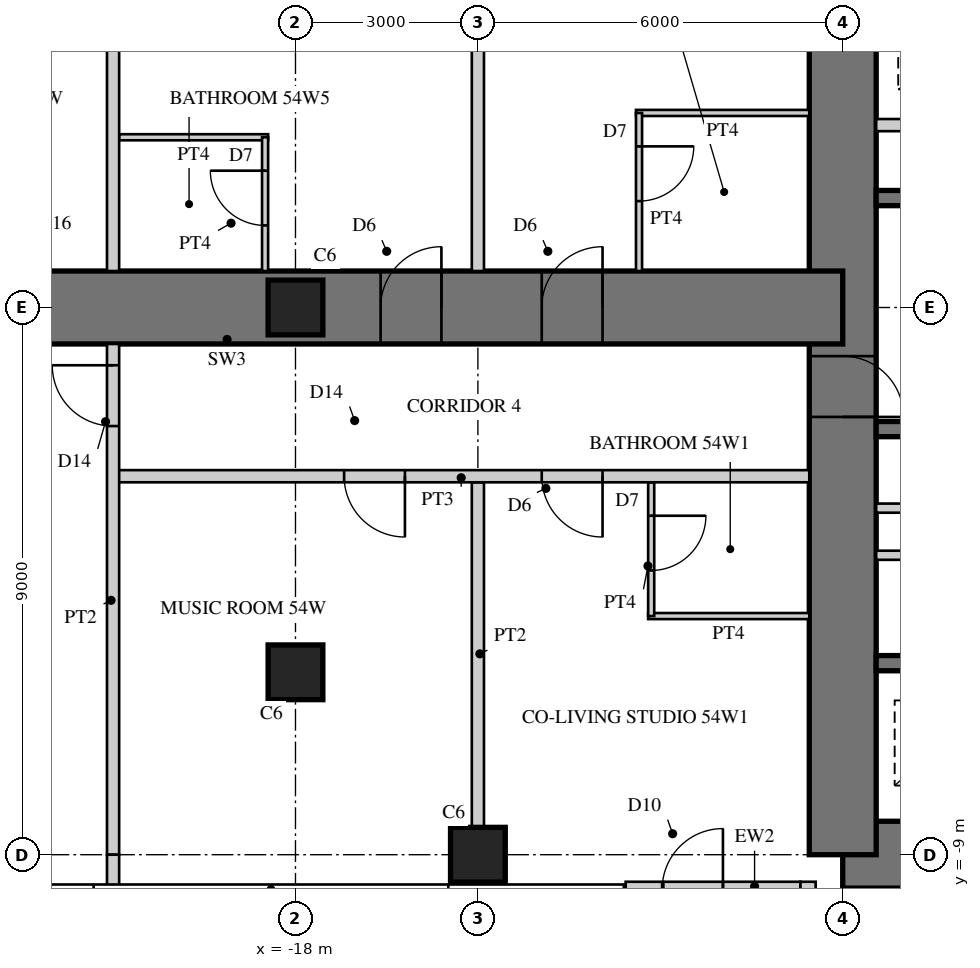
"""IFC4 building model, lengths in metres.
Left out: names, types, materials, properties, quantities, classifications, styles, units other than length and angle.
Written with IfcOpenShell. Run it as: python <this file> out.ifc"""

import sys

from ifc_helpers import new_model, si_unit, direction, frame, frame_2d, origin, origin_2d, place, context, subcontext, project, spatial, rectangle, hollow_rectangle, extrude, element, fill, save


model = new_model("IFC4")
c1 = context("Model", 3, precision=1e-05, world=origin(), true_north=direction((0.0, 1.0)))
c2 = subcontext(c1, "Body", "Model", "MODEL_VIEW")
j1 = project(units=[si_unit("LENGTHUNIT", "METRE"), si_unit("PLANEANGLEUNIT", "RADIAN")], contexts=[c1])
p1 = place(None, origin())
s1 = spatial("IfcSite", under=j1, at=p1, CompositionType="ELEMENT")
p2 = place(p1, origin())
s2 = spatial("IfcBuilding", under=s1, at=p2, CompositionType="ELEMENT")
p3 = place(p2, frame((0.0, 0.0, 213.7)))
s3 = spatial("IfcBuildingStorey", under=s2, at=p3, CompositionType="ELEMENT", Elevation=213.7)
p4 = place(p3, frame((-9.0, -9.0, 0.0), z_axis=(0.0, 0.0, 1.0), x_axis=(1.0, 0.0, 0.0)))
e1 = element("IfcWall", 1, at=p4, inside=s3, PredefinedType="SHEAR", context=c2, shape_type="SweptSolid", body=[
    extrude(rectangle(XDim=18.0, YDim=1.1, at=frame_2d((9.0, 0.0))), origin(), (0.0, 0.0, 1.0), 3.4),
])
p5 = place(p4, frame((9.8, 0.0, 0.0)))
e2 = element("IfcOpeningElement", 2, at=p5, cuts=e1, PredefinedType="OPENING", context=c2, shape_type="SweptSolid", body=[
    extrude(rectangle(XDim=1.0, YDim=2.4, at=frame_2d((0.5, 1.2))), frame((0.0, 0.56, 0.0), z_axis=(0.0, -1.0, 0.0), x_axis=(1.0, 0.0, 0.0)), (0.0, 0.0, 1.0), 1.12),
])
p6 = place(p3, frame((-9.0, 9.0, 0.0), z_axis=(0.0, 0.0, 1.0), x_axis=(0.0, -1.0, 0.0)))
e3 = element("IfcWall", 3, at=p6, inside=s3, PredefinedType="SHEAR", context=c2, shape_type="SweptSolid", body=[
    extrude(rectangle(XDim=18.0, YDim=1.1, at=frame_2d((9.0, 0.0))), origin(), (0.0, 0.0, 1.0), 3.4),
])
p7 = place(p6, frame((9.8, 0.0, 0.0)))
e4 = element("IfcOpeningElement", 4, at=p7, cuts=e3, PredefinedType="OPENING", context=c2, shape_type="SweptSolid", body=[
    extrude(rectangle(XDim=1.0, YDim=2.4, at=frame_2d((0.5, 1.2))), frame((0.0, 0.56, 0.0), z_axis=(0.0, -1.0, 0.0), x_axis=(1.0, 0.0, 0.0)), (0.0, 0.0, 1.0), 1.12),
])
p8 = place(p3, frame((-2.125, 1.8, 0.0), z_axis=(0.0, 0.0, 1.0), x_axis=(-1.0, 0.0, 0.0)))
e5 = element("IfcWall", 5, at=p8, inside=s3, PredefinedType="SHEAR", context=c2, shape_type="SweptSolid", body=[
    extrude(rectangle(XDim=6.325, YDim=0.25, at=frame_2d((3.163, 0.0))), origin(), (0.0, 0.0, 1.0), 3.4),
])
p9 = place(p3, frame((-5.725, 3.0, 0.0), z_axis=(0.0, 0.0, 1.0), x_axis=(-1.0, 0.0, 0.0)))
e6 = element("IfcWall", 6, at=p9, inside=s3, PredefinedType="PARTITIONING", context=c2, shape_type="SweptSolid", body=[
    extrude(rectangle(XDim=2.725, YDim=0.2, at=frame_2d((1.362, 0.0))), origin(), (0.0, 0.0, 1.0), 3.4),
])
p10 = place(p3, frame((-1.925, -2.0, 0.0), z_axis=(0.0, 0.0, 1.0), x_axis=(-1.0, 0.0, 0.0)))
e7 = element("IfcWall", 7, at=p10, inside=s3, PredefinedType="SHEAR", context=c2, shape_type="SweptSolid", body=[
    extrude(rectangle(XDim=6.525, YDim=0.25, at=frame_2d((3.262, 0.0))), origin(), (0.0, 0.0, 1.0), 3.4),
])
p11 = place(p3, frame((-1.925, -5.85, 0.0), z_axis=(0.0, 0.0, 1.0), x_axis=(-1.0, 0.0, 0.0)))
e8 = element("IfcWall", 8, at=p11, inside=s3, PredefinedType="SHEAR", context=c2, shape_type="SweptSolid", body=[
    extrude(rectangle(XDim=6.525, YDim=0.25, at=frame_2d((3.262, 0.0))), origin(), (0.0, 0.0, 1.0), 3.4),
])
p12 = place(p11, frame((0.471, 0.0, 0.0)))
e9 = element("IfcOpeningElement", 9, at=p12, cuts=e8, PredefinedType="OPENING", context=c2, shape_type="SweptSolid", body=[
    extrude(rectangle(XDim=1.1, YDim=2.2, at=frame_2d((0.55, 1.1))), frame((0.0, 0.135, 0.0), z_axis=(0.0, -1.0, 0.0), x_axis=(1.0, 0.0, 0.0)), (0.0, 0.0, 1.0), 0.27),
])
p13 = place(p11, frame((2.712, 0.0, 0.0)))
e10 = element("IfcOpeningElement", 10, at=p13, cuts=e8, PredefinedType="OPENING", context=c2, shape_type="SweptSolid", body=[
    extrude(rectangle(XDim=1.1, YDim=2.2, at=frame_2d((0.55, 1.1))), frame((0.0, 0.135, 0.0), z_axis=(0.0, -1.0, 0.0), x_axis=(1.0, 0.0, 0.0)), (0.0, 0.0, 1.0), 0.27),
])
p14 = place(p11, frame((4.954, 0.0, 0.0)))
e11 = element("IfcOpeningElement", 11, at=p14, cuts=e8, PredefinedType="OPENING", context=c2, shape_type="SweptSolid", body=[
    extrude(rectangle(XDim=1.1, YDim=2.2, at=frame_2d((0.55, 1.1))), frame((0.0, 0.135, 0.0), z_axis=(0.0, -1.0, 0.0), x_axis=(1.0, 0.0, 0.0)), (0.0, 0.0, 1.0), 0.27),
])
p15 = place(p3, frame((-1.925, -3.3, 0.0), z_axis=(0.0, 0.0, 1.0), x_axis=(-1.0, 0.0, 0.0)))
e12 = element("IfcWall", 12, at=p15, inside=s3, PredefinedType="PARTITIONING", context=c2, shape_type="SweptSolid", body=[
    extrude(rectangle(XDim=6.525, YDim=0.15, at=frame_2d((3.262, 0.0))), origin(), (0.0, 0.0, 1.0), 3.4),
])
p16 = place(p15, frame((0.075, 0.0, 0.0)))
e13 = element("IfcOpeningElement", 13, at=p16, cuts=e12, PredefinedType="OPENING", context=c2, shape_type="SweptSolid", body=[
    extrude(rectangle(XDim=0.8, YDim=2.1, at=frame_2d((0.4, 1.05))), frame((0.0, 0.085, 0.0), z_axis=(0.0, -1.0, 0.0), x_axis=(1.0, 0.0, 0.0)), (0.0, 0.0, 1.0), 0.17),
])
p17 = place(p15, frame((3.675, 0.0, 0.0)))
e14 = element("IfcOpeningElement", 14, at=p17, cuts=e12, PredefinedType="OPENING", context=c2, shape_type="SweptSolid", body=[
    extrude(rectangle(XDim=0.8, YDim=2.1, at=frame_2d((0.4, 1.05))), frame((0.0, 0.085, 0.0), z_axis=(0.0, -1.0, 0.0), x_axis=(1.0, 0.0, 0.0)), (0.0, 0.0, 1.0), 0.17),
])
p18 = place(p3, frame((-9.0, 0.0, 0.0), z_axis=(0.0, 0.0, 1.0), x_axis=(-1.0, 0.0, 0.0)))
e15 = element("IfcWall", 15, at=p18, inside=s3, PredefinedType="SHEAR", context=c2, shape_type="SweptSolid", body=[
    extrude(rectangle(XDim=18.0, YDim=1.2, at=frame_2d((9.0, 0.0))), origin(), (0.0, 0.0, 1.0), 3.4),
])
p19 = place(p18, frame((3.95, 0.0, 0.0)))
e16 = element("IfcOpeningElement", 16, at=p19, cuts=e15, PredefinedType="OPENING", context=c2, shape_type="SweptSolid", body=[
    extrude(rectangle(XDim=1.0, YDim=2.15, at=frame_2d((0.5, 1.075))), frame((0.0, 0.61, 0.0), z_axis=(0.0, -1.0, 0.0), x_axis=(1.0, 0.0, 0.0)), (0.0, 0.0, 1.0), 1.22),
])
p20 = place(p18, frame((6.6, 0.0, 0.0)))
e17 = element("IfcOpeningElement", 17, at=p20, cuts=e15, PredefinedType="OPENING", context=c2, shape_type="SweptSolid", body=[
    extrude(rectangle(XDim=1.0, YDim=2.15, at=frame_2d((0.5, 1.075))), frame((0.0, 0.61, 0.0), z_axis=(0.0, -1.0, 0.0), x_axis=(1.0, 0.0, 0.0)), (0.0, 0.0, 1.0), 1.22),
])
p21 = place(p18, frame((13.25, 0.0, 0.0)))
e18 = element("IfcOpeningElement", 18, at=p21, cuts=e15, PredefinedType="OPENING", context=c2, shape_type="SweptSolid", body=[
    extrude(rectangle(XDim=1.0, YDim=2.0, at=frame_2d((0.5, 1.0))), frame((0.0, 0.61, 0.0), z_axis=(0.0, -1.0, 0.0), x_axis=(1.0, 0.0, 0.0)), (0.0, 0.0, 1.0), 1.22),
])
for number, where, z_axis, x_axis in (
    (19, (-15.0, -9.0, 0.0), (0.0, 0.0, 1.0), (1.0, 0.0, 0.0)),
    (20, (-18.0, 0.0, 0.0), (0.0, 0.0, 1.0), (1.0, 0.0, 0.0)),
    (21, (-18.0, -6.0, 0.0), (0.0, 0.0, 1.0), (1.0, 0.0, 0.0)),
):
    element("IfcColumn", number, at=place(p3, frame(where, z_axis=z_axis, x_axis=x_axis)), inside=s3, PredefinedType="COLUMN", context=c2, shape_type="SweptSolid", body=[
        extrude(rectangle(XDim=0.9, YDim=0.9, at=origin_2d()), origin(), (0.0, 0.0, 1.0), 3.4),
    ])
p22 = place(p3, frame((-12.57, -9.57, 0.0), z_axis=(0.0, 0.0, 1.0), x_axis=(1.0, 0.0, 0.0)))
e22 = element("IfcWall", 22, at=p22, inside=s3, PredefinedType="SOLIDWALL", context=c2, shape_type="SweptSolid", body=[
    extrude(rectangle(XDim=2.875, YDim=0.25, at=frame_2d((1.438, 0.0))), origin(), (0.0, 0.0, 1.0), 3.15),
])
p23 = place(p22, frame((0.6, 0.0, 0.0)))
e23 = element("IfcOpeningElement", 23, at=p23, cuts=e22, PredefinedType="OPENING", context=c2, shape_type="SweptSolid", body=[
    extrude(rectangle(XDim=1.0, YDim=2.2, at=frame_2d((0.5, 1.1))), frame((0.0, 0.135, 0.0), z_axis=(0.0, -1.0, 0.0), x_axis=(1.0, 0.0, 0.0)), (0.0, 0.0, 1.0), 0.27),
])
p24 = place(p3, frame((-9.57, -9.445, 0.0), z_axis=(0.0, 0.0, 1.0), x_axis=(0.0, -1.0, 0.0)))
e24 = element("IfcWall", 24, at=p24, inside=s3, PredefinedType="SOLIDWALL", context=c2, shape_type="SweptSolid", body=[
    extrude(rectangle(XDim=3.125, YDim=0.25, at=frame_2d((1.562, 0.0))), origin(), (0.0, 0.0, 1.0), 3.15),
])
p25 = place(p24, frame((0.6, 0.0, 0.0)))
e25 = element("IfcOpeningElement", 25, at=p25, cuts=e24, PredefinedType="OPENING", context=c2, shape_type="SweptSolid", body=[
    extrude(rectangle(XDim=1.0, YDim=2.2, at=frame_2d((0.5, 1.1))), frame((0.0, 0.135, 0.0), z_axis=(0.0, -1.0, 0.0), x_axis=(1.0, 0.0, 0.0)), (0.0, 0.0, 1.0), 0.27),
])
p26 = place(p3, frame((-3.325, -4.075, 0.0), z_axis=(0.0, 0.0, 1.0), x_axis=(-1.0, 0.0, 0.0)))
e26 = element("IfcWall", 26, at=p26, inside=s3, PredefinedType="PARTITIONING", context=c2, shape_type="SweptSolid", body=[
    extrude(rectangle(XDim=5.125, YDim=0.15, at=frame_2d((2.562, 0.0))), origin(), (0.0, 0.0, 1.0), 3.15),
])
p27 = place(p26, frame((2.062, 0.0, 0.0)))
e27 = element("IfcOpeningElement", 27, at=p27, cuts=e26, PredefinedType="OPENING", context=c2, shape_type="SweptSolid", body=[
    extrude(rectangle(XDim=1.0, YDim=2.1, at=frame_2d((0.5, 1.05))), frame((0.0, 0.085, 0.0), z_axis=(0.0, -1.0, 0.0), x_axis=(1.0, 0.0, 0.0)), (0.0, 0.0, 1.0), 0.17),
])
p28 = place(p3, frame((-9.55, -5.075, 0.0), z_axis=(0.0, 0.0, 1.0), x_axis=(-1.0, 0.0, 0.0)))
e28 = element("IfcWall", 28, at=p28, inside=s3, PredefinedType="PARTITIONING", context=c2, shape_type="SweptSolid", body=[
    extrude(rectangle(XDim=2.65, YDim=0.1, at=frame_2d((1.325, 0.0))), origin(), (0.0, 0.0, 1.0), 3.15),
])
p29 = place(p3, frame((-12.15, -2.875, 0.0), z_axis=(0.0, 0.0, 1.0), x_axis=(0.0, -1.0, 0.0)))
e29 = element("IfcWall", 29, at=p29, inside=s3, PredefinedType="PARTITIONING", context=c2, shape_type="SweptSolid", body=[
    extrude(rectangle(XDim=2.2, YDim=0.1, at=frame_2d((1.1, 0.0))), origin(), (0.0, 0.0, 1.0), 3.15),
])
p30 = place(p29, frame((0.55, 0.0, 0.0)))
e30 = element("IfcOpeningElement", 30, at=p30, cuts=e29, PredefinedType="OPENING", context=c2, shape_type="SweptSolid", body=[
    extrude(rectangle(XDim=0.9, YDim=2.1, at=frame_2d((0.45, 1.05))), frame((0.0, 0.06, 0.0), z_axis=(0.0, -1.0, 0.0), x_axis=(1.0, 0.0, 0.0)), (0.0, 0.0, 1.0), 0.12),
])
p31 = place(p3, frame((-9.55, 3.2, 0.0), z_axis=(0.0, 0.0, 1.0), x_axis=(-1.0, 0.0, 0.0)))
e31 = element("IfcWall", 31, at=p31, inside=s3, PredefinedType="PARTITIONING", context=c2, shape_type="SweptSolid", body=[
    extrude(rectangle(XDim=2.85, YDim=0.1, at=frame_2d((1.425, 0.0))), origin(), (0.0, 0.0, 1.0), 3.15),
])
p32 = place(p3, frame((-12.35, 3.2, 0.0), z_axis=(0.0, 0.0, 1.0), x_axis=(0.0, -1.0, 0.0)))
e32 = element("IfcWall", 32, at=p32, inside=s3, PredefinedType="PARTITIONING", context=c2, shape_type="SweptSolid", body=[
    extrude(rectangle(XDim=2.6, YDim=0.1, at=frame_2d((1.3, 0.0))), origin(), (0.0, 0.0, 1.0), 3.15),
])
p33 = place(p32, frame((0.55, 0.0, 0.0)))
e33 = element("IfcOpeningElement", 33, at=p33, cuts=e32, PredefinedType="OPENING", context=c2, shape_type="SweptSolid", body=[
    extrude(rectangle(XDim=0.9, YDim=2.1, at=frame_2d((0.45, 1.05))), frame((0.0, 0.06, 0.0), z_axis=(0.0, -1.0, 0.0), x_axis=(1.0, 0.0, 0.0)), (0.0, 0.0, 1.0), 0.12),
])
p34 = place(p3, frame((-15.0, -2.875, 0.0), z_axis=(0.0, 0.0, 1.0), x_axis=(0.0, -1.0, 0.0)))
e34 = element("IfcWall", 34, at=p34, inside=s3, PredefinedType="SOLIDWALL", context=c2, shape_type="SweptSolid", body=[
    extrude(rectangle(XDim=5.675, YDim=0.2, at=frame_2d((2.837, 0.0))), origin(), (0.0, 0.0, 1.0), 2.1),
])
p35 = place(p3, frame((-15.0, 8.55, 0.0), z_axis=(0.0, 0.0, 1.0), x_axis=(0.0, -1.0, 0.0)))
e35 = element("IfcWall", 35, at=p35, inside=s3, PredefinedType="SOLIDWALL", context=c2, shape_type="SweptSolid", body=[
    extrude(rectangle(XDim=7.95, YDim=0.2, at=frame_2d((3.975, 0.0))), origin(), (0.0, 0.0, 1.0), 2.1),
])
p36 = place(p3, frame((-18.45, 2.8, 0.0), z_axis=(0.0, 0.0, 1.0), x_axis=(-1.0, 0.0, 0.0)))
e36 = element("IfcWall", 36, at=p36, inside=s3, PredefinedType="PARTITIONING", context=c2, shape_type="SweptSolid", body=[
    extrude(rectangle(XDim=2.45, YDim=0.1, at=frame_2d((1.225, 0.0))), origin(), (0.0, 0.0, 1.0), 3.15),
])
p37 = place(p3, frame((-18.5, 2.8, 0.0), z_axis=(0.0, 0.0, 1.0), x_axis=(0.0, -1.0, 0.0)))
e37 = element("IfcWall", 37, at=p37, inside=s3, PredefinedType="PARTITIONING", context=c2, shape_type="SweptSolid", body=[
    extrude(rectangle(XDim=2.2, YDim=0.1, at=frame_2d((1.1, 0.0))), origin(), (0.0, 0.0, 1.0), 3.15),
])
p38 = place(p37, frame((0.55, 0.0, 0.0)))
e38 = element("IfcOpeningElement", 38, at=p38, cuts=e37, PredefinedType="OPENING", context=c2, shape_type="SweptSolid", body=[
    extrude(rectangle(XDim=0.9, YDim=2.1, at=frame_2d((0.45, 1.05))), frame((0.0, 0.06, 0.0), z_axis=(0.0, -1.0, 0.0), x_axis=(1.0, 0.0, 0.0)), (0.0, 0.0, 1.0), 0.12),
])
p39 = place(p3, frame((-9.55, -2.775, 0.0), z_axis=(0.0, 0.0, 1.0), x_axis=(-1.0, 0.0, 0.0)))
e39 = element("IfcWall", 39, at=p39, inside=s3, PredefinedType="SOLIDWALL", context=c2, shape_type="SweptSolid", body=[
    extrude(rectangle(XDim=11.45, YDim=0.2, at=frame_2d((5.725, 0.0))), origin(), (0.0, 0.0, 1.0), 3.15),
])
p40 = place(p39, frame((3.4, 0.0, 0.0)))
e40 = element("IfcOpeningElement", 40, at=p40, cuts=e39, PredefinedType="OPENING", context=c2, shape_type="SweptSolid", body=[
    extrude(rectangle(XDim=1.0, YDim=2.15, at=frame_2d((0.5, 1.075))), frame((0.0, 0.11, 0.0), z_axis=(0.0, -1.0, 0.0), x_axis=(1.0, 0.0, 0.0)), (0.0, 0.0, 1.0), 0.22),
])
p41 = place(p39, frame((6.65, 0.0, 0.0)))
e41 = element("IfcOpeningElement", 41, at=p41, cuts=e39, PredefinedType="OPENING", context=c2, shape_type="SweptSolid", body=[
    extrude(rectangle(XDim=1.0, YDim=2.2, at=frame_2d((0.5, 1.1))), frame((0.0, 0.11, 0.0), z_axis=(0.0, -1.0, 0.0), x_axis=(1.0, 0.0, 0.0)), (0.0, 0.0, 1.0), 0.22),
])
p42 = place(p3, frame((-21.0, 9.0, 0.0), z_axis=(0.0, 0.0, 1.0), x_axis=(0.0, -1.0, 0.0)))
e42 = element("IfcWall", 42, at=p42, inside=s3, PredefinedType="SOLIDWALL", context=c2, shape_type="SweptSolid", body=[
    extrude(rectangle(XDim=8.4, YDim=0.2, at=frame_2d((4.2, 0.0))), origin(), (0.0, 0.0, 1.0), 2.3),
])
p43 = place(p3, frame((-21.0, -0.6, 0.0), z_axis=(0.0, 0.0, 1.0), x_axis=(0.0, -1.0, 0.0)))
e43 = element("IfcWall", 43, at=p43, inside=s3, PredefinedType="SOLIDWALL", context=c2, shape_type="SweptSolid", body=[
    extrude(rectangle(XDim=8.4, YDim=0.2, at=frame_2d((4.2, 0.0))), origin(), (0.0, 0.0, 1.0), 2.3),
])
p44 = place(p43, frame((0.35, 0.0, 0.0)))
e44 = element("IfcOpeningElement", 44, at=p44, cuts=e43, PredefinedType="OPENING", context=c2, shape_type="SweptSolid", body=[
    extrude(rectangle(XDim=1.0, YDim=2.2, at=frame_2d((0.5, 1.1))), frame((0.0, 0.11, 0.0), z_axis=(0.0, -1.0, 0.0), x_axis=(1.0, 0.0, 0.0)), (0.0, 0.0, 1.0), 0.22),
])
p45 = place(p3, frame((-21.0, -9.0, 0.0), z_axis=(0.0, 0.0, 1.0), x_axis=(0.0, -1.0, 0.0)))
e45 = element("IfcWall", 45, at=p45, inside=s3, PredefinedType="SOLIDWALL", context=c2, shape_type="SweptSolid", body=[
    extrude(rectangle(XDim=0.53, YDim=0.2, at=frame_2d((0.265, 0.0))), origin(), (0.0, 0.0, 1.0), 3.15),
])
p46 = place(p23, origin())
e46 = element("IfcDoor", 46, at=p46, inside=s3, OperationType="SINGLE_SWING_RIGHT", PredefinedType="DOOR", context=c2, shape_type="SweptSolid", body=[
    extrude(hollow_rectangle(XDim=1.0, YDim=2.2, WallThickness=0.06, at=frame_2d((0.5, 1.1))), frame((0.0, 0.025, 0.0), z_axis=(0.0, -1.0, 0.0), x_axis=(1.0, 0.0, 0.0)), (0.0, 0.0, 1.0), 0.05),
    extrude(rectangle(XDim=0.879, YDim=2.079, at=frame_2d((0.5, 1.1))), frame((0.0, 0.025, 0.0), z_axis=(0.0, -1.0, 0.0), x_axis=(1.0, 0.0, 0.0)), (0.0, 0.0, 1.0), 0.05),
])
fill(e23, e46)
p47 = place(p30, origin())
e47 = element("IfcDoor", 47, at=p47, inside=s3, OperationType="SINGLE_SWING_LEFT", PredefinedType="DOOR", context=c2, shape_type="SweptSolid", body=[
    extrude(rectangle(XDim=0.9, YDim=2.1, at=frame_2d((0.45, 1.05))), frame((0.0, 0.025, 0.0), z_axis=(0.0, -1.0, 0.0), x_axis=(1.0, 0.0, 0.0)), (0.0, 0.0, 1.0), 0.05),
])
fill(e30, e47)
p48 = place(p33, origin())
e48 = element("IfcDoor", 48, at=p48, inside=s3, OperationType="SINGLE_SWING_LEFT", PredefinedType="DOOR", context=c2, shape_type="SweptSolid", body=[
    extrude(rectangle(XDim=0.9, YDim=2.1, at=frame_2d((0.45, 1.05))), frame((0.0, 0.025, 0.0), z_axis=(0.0, -1.0, 0.0), x_axis=(1.0, 0.0, 0.0)), (0.0, 0.0, 1.0), 0.05),
])
fill(e33, e48)
p49 = place(p38, frame((0.9, 0.0, 0.0), z_axis=(0.0, 0.0, 1.0), x_axis=(-1.0, 0.0, 0.0)))
e49 = element("IfcDoor", 49, at=p49, inside=s3, OperationType="SINGLE_SWING_RIGHT", PredefinedType="DOOR", context=c2, shape_type="SweptSolid", body=[
    extrude(rectangle(XDim=0.9, YDim=2.1, at=frame_2d((0.45, 1.05))), frame((0.0, 0.025, 0.0), z_axis=(0.0, -1.0, 0.0), x_axis=(1.0, 0.0, 0.0)), (0.0, 0.0, 1.0), 0.05),
])
fill(e38, e49)
p50 = place(p40, origin())
e50 = element("IfcDoor", 50, at=p50, inside=s3, OperationType="SINGLE_SWING_LEFT", PredefinedType="DOOR", context=c2, shape_type="SweptSolid", body=[
    extrude(rectangle(XDim=1.0, YDim=2.15, at=frame_2d((0.5, 1.075))), frame((0.0, 0.025, 0.0), z_axis=(0.0, -1.0, 0.0), x_axis=(1.0, 0.0, 0.0)), (0.0, 0.0, 1.0), 0.05),
])
fill(e40, e50)
p51 = place(p41, origin())
e51 = element("IfcDoor", 51, at=p51, inside=s3, OperationType="SINGLE_SWING_LEFT", PredefinedType="DOOR", context=c2, shape_type="SweptSolid", body=[
    extrude(rectangle(XDim=1.0, YDim=2.2, at=frame_2d((0.5, 1.1))), frame((0.0, 0.025, 0.0), z_axis=(0.0, -1.0, 0.0), x_axis=(1.0, 0.0, 0.0)), (0.0, 0.0, 1.0), 0.05),
])
fill(e41, e51)
p52 = place(p44, frame((1.0, 0.0, 0.0), z_axis=(0.0, 0.0, 1.0), x_axis=(-1.0, 0.0, 0.0)))
e52 = element("IfcDoor", 52, at=p52, inside=s3, OperationType="SINGLE_SWING_RIGHT", PredefinedType="DOOR", context=c2, shape_type="SweptSolid", body=[
    extrude(rectangle(XDim=1.0, YDim=2.2, at=frame_2d((0.5, 1.1))), frame((0.0, 0.025, 0.0), z_axis=(0.0, -1.0, 0.0), x_axis=(1.0, 0.0, 0.0)), (0.0, 0.0, 1.0), 0.05),
])
fill(e44, e52)
p53 = place(p19, frame((1.0, 0.0, 0.0), z_axis=(0.0, 0.0, 1.0), x_axis=(-1.0, 0.0, 0.0)))
e53 = element("IfcDoor", 53, at=p53, inside=s3, OperationType="SINGLE_SWING_RIGHT", PredefinedType="DOOR", context=c2, shape_type="SweptSolid", body=[
    extrude(rectangle(XDim=1.0, YDim=2.15, at=frame_2d((0.5, 1.075))), frame((0.0, 0.025, 0.0), z_axis=(0.0, -1.0, 0.0), x_axis=(1.0, 0.0, 0.0)), (0.0, 0.0, 1.0), 0.05),
])
fill(e16, e53)
p54 = place(p20, frame((1.0, 0.0, 0.0), z_axis=(0.0, 0.0, 1.0), x_axis=(-1.0, 0.0, 0.0)))
e54 = element("IfcDoor", 54, at=p54, inside=s3, OperationType="SINGLE_SWING_RIGHT", PredefinedType="DOOR", context=c2, shape_type="SweptSolid", body=[
    extrude(rectangle(XDim=1.0, YDim=2.15, at=frame_2d((0.5, 1.075))), frame((0.0, 0.025, 0.0), z_axis=(0.0, -1.0, 0.0), x_axis=(1.0, 0.0, 0.0)), (0.0, 0.0, 1.0), 0.05),
])
fill(e17, e54)
p55 = place(p7, origin())
e55 = element("IfcDoor", 55, at=p55, inside=s3, OperationType="SINGLE_SWING_RIGHT", PredefinedType="DOOR", context=c2, shape_type="SweptSolid", body=[
    extrude(rectangle(XDim=1.0, YDim=2.4, at=frame_2d((0.5, 1.2))), frame((0.0, 0.055, 0.0), z_axis=(0.0, -1.0, 0.0), x_axis=(1.0, 0.0, 0.0)), (0.0, 0.0, 1.0), 0.05),
])
fill(e4, e55)
save(model, sys.argv[1])
